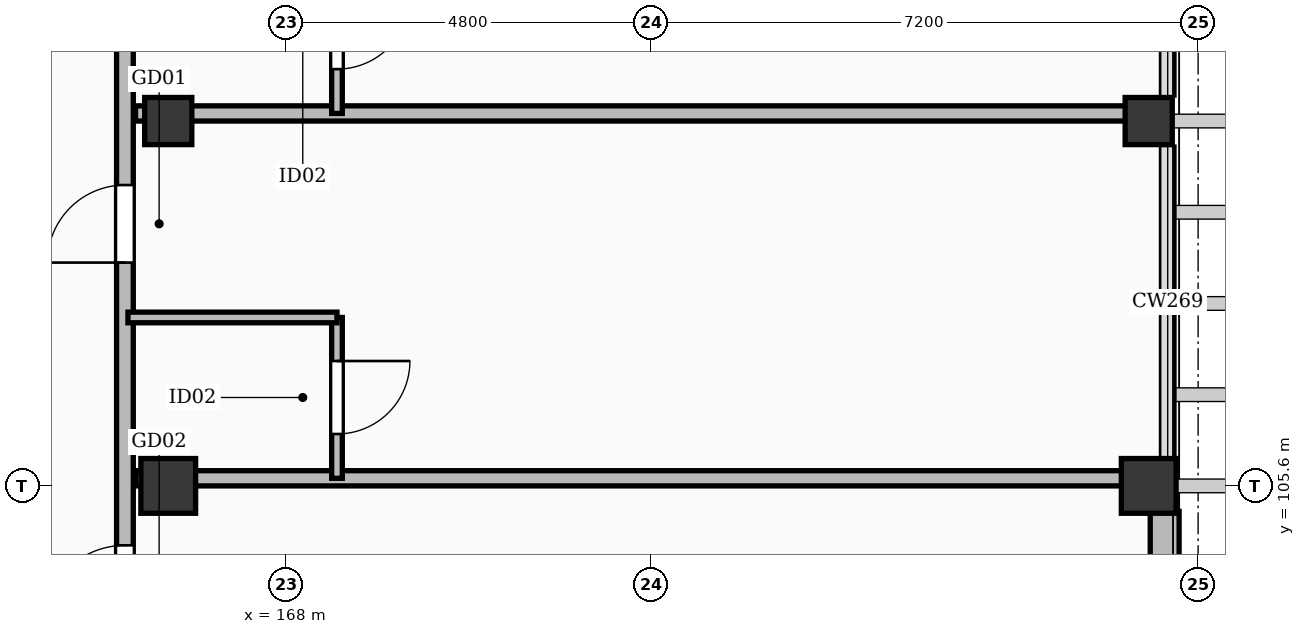
"""IFC4 building model, lengths in metres.
Left out: names, types, materials, properties, quantities, classifications, styles, units other than length and angle.
Written with IfcOpenShell. Run it as: python <this file> out.ifc"""

import sys

from ifc_helpers import new_model, si_unit, direction, frame, frame_2d, origin, origin_2d, place, context, subcontext, project, spatial, rectangle, extrude, element, fill, save


model = new_model("IFC4")
c1 = context("Model", 3, precision=1e-05, world=origin(), true_north=direction((0.0, 1.0)))
c2 = subcontext(c1, "Body", "Model", "MODEL_VIEW")
j1 = project(units=[si_unit("LENGTHUNIT", "METRE"), si_unit("PLANEANGLEUNIT", "RADIAN")], contexts=[c1])
p1 = place(None, origin())
s1 = spatial("IfcSite", under=j1, at=p1, CompositionType="ELEMENT")
p2 = place(p1, origin())
s2 = spatial("IfcBuilding", under=s1, at=p2, CompositionType="ELEMENT")
p3 = place(p2, frame((0.0, 0.0, 31.8)))
s3 = spatial("IfcBuildingStorey", under=s2, at=p3, CompositionType="ELEMENT", Elevation=31.8)
for number, where, z_axis, x_axis in (
    (1, (166.45, 105.6, 0.0), (0.0, 0.0, 1.0), (1.0, 0.0, 0.0)),
    (2, (179.35, 105.6, 0.0), (0.0, 0.0, 1.0), (1.0, 0.0, 0.0)),
):
    element("IfcColumn", number, at=place(p3, frame(where, z_axis=z_axis, x_axis=x_axis)), inside=s3, PredefinedType="COLUMN", context=c2, shape_type="SweptSolid", body=[
        extrude(rectangle(XDim=0.72, YDim=0.72, at=origin_2d()), origin(), (0.0, 0.0, 1.0), 3.6),
    ])
for number, where, z_axis, x_axis in (
    (3, (166.45, 110.4, 0.0), (0.0, 0.0, 1.0), (1.0, 0.0, 0.0)),
    (4, (179.35, 110.4, 0.0), (0.0, 0.0, 1.0), (1.0, 0.0, 0.0)),
):
    element("IfcColumn", number, at=place(p3, frame(where, z_axis=z_axis, x_axis=x_axis)), inside=s3, PredefinedType="COLUMN", context=c2, shape_type="SweptSolid", body=[
        extrude(rectangle(XDim=0.62, YDim=0.62, at=origin_2d()), origin(), (0.0, 0.0, 1.0), 3.6),
    ])
p4 = place(p3, frame((179.56, 105.265, 0.0), z_axis=(0.0, 0.0, 1.0), x_axis=(0.0, -1.0, 0.0)))
e5 = element("IfcWall", 5, at=p4, inside=s3, PredefinedType="SOLIDWALL", context=c2, shape_type="SweptSolid", body=[
    extrude(rectangle(XDim=4.18, YDim=0.38, at=frame_2d((2.09, 0.0))), origin(), (0.0, 0.0, 1.0), 2.602),
])
p5 = place(p4, frame((1.34, 0.0, 0.55)))
e6 = element("IfcOpeningElement", 6, at=p5, cuts=e5, PredefinedType="OPENING", context=c2, shape_type="SweptSolid", body=[
    extrude(rectangle(XDim=1.5, YDim=1.74, at=frame_2d((0.75, 0.87))), frame((0.0, 0.202, 0.0), z_axis=(0.0, -1.0, 0.0), x_axis=(1.0, 0.0, 0.0)), (0.0, 0.0, 1.0), 0.404),
])
p6 = place(p3, frame((165.88, 48.35, 0.0), z_axis=(0.0, 0.0, 1.0), x_axis=(0.0, 1.0, 0.0)))
e7 = element("IfcWall", 7, at=p6, inside=s3, PredefinedType="PARTITIONING", context=c2, shape_type="SweptSolid", body=[
    extrude(rectangle(XDim=77.3, YDim=0.22, at=frame_2d((38.65, 0.0))), origin(), (0.0, 0.0, 1.0), 2.602),
])
p7 = place(p6, frame((5.15, 0.0, 0.0)))
e8 = element("IfcOpeningElement", 8, at=p7, cuts=e7, PredefinedType="OPENING", context=c2, shape_type="SweptSolid", body=[
    extrude(rectangle(XDim=1.14, YDim=2.26, at=frame_2d((0.57, 1.13))), frame((0.0, 0.122, 0.0), z_axis=(0.0, -1.0, 0.0), x_axis=(1.0, 0.0, 0.0)), (0.0, 0.0, 1.0), 0.244),
])
p8 = place(p6, frame((12.188, 0.0, 0.0)))
e9 = element("IfcOpeningElement", 9, at=p8, cuts=e7, PredefinedType="OPENING", context=c2, shape_type="SweptSolid", body=[
    extrude(rectangle(XDim=1.12, YDim=2.15, at=frame_2d((0.56, 1.075))), frame((0.0, 0.122, 0.0), z_axis=(0.0, -1.0, 0.0), x_axis=(1.0, 0.0, 0.0)), (0.0, 0.0, 1.0), 0.244),
])
p9 = place(p6, frame((16.988, 0.0, 0.0)))
e10 = element("IfcOpeningElement", 10, at=p9, cuts=e7, PredefinedType="OPENING", context=c2, shape_type="SweptSolid", body=[
    extrude(rectangle(XDim=1.28, YDim=2.16, at=frame_2d((0.64, 1.08))), frame((0.0, 0.122, 0.0), z_axis=(0.0, -1.0, 0.0), x_axis=(1.0, 0.0, 0.0)), (0.0, 0.0, 1.0), 0.244),
])
p10 = place(p6, frame((21.788, 0.0, 0.0)))
e11 = element("IfcOpeningElement", 11, at=p10, cuts=e7, PredefinedType="OPENING", context=c2, shape_type="SweptSolid", body=[
    extrude(rectangle(XDim=1.05, YDim=2.18, at=frame_2d((0.525, 1.09))), frame((0.0, 0.122, 0.0), z_axis=(0.0, -1.0, 0.0), x_axis=(1.0, 0.0, 0.0)), (0.0, 0.0, 1.0), 0.244),
])
p11 = place(p6, frame((26.588, 0.0, 0.0)))
e12 = element("IfcOpeningElement", 12, at=p11, cuts=e7, PredefinedType="OPENING", context=c2, shape_type="SweptSolid", body=[
    extrude(rectangle(XDim=1.08, YDim=2.25, at=frame_2d((0.54, 1.125))), frame((0.0, 0.122, 0.0), z_axis=(0.0, -1.0, 0.0), x_axis=(1.0, 0.0, 0.0)), (0.0, 0.0, 1.0), 0.244),
])
p12 = place(p6, frame((31.388, 0.0, 0.0)))
e13 = element("IfcOpeningElement", 13, at=p12, cuts=e7, PredefinedType="OPENING", context=c2, shape_type="SweptSolid", body=[
    extrude(rectangle(XDim=1.02, YDim=2.2, at=frame_2d((0.51, 1.1))), frame((0.0, 0.122, 0.0), z_axis=(0.0, -1.0, 0.0), x_axis=(1.0, 0.0, 0.0)), (0.0, 0.0, 1.0), 0.244),
])
p13 = place(p6, frame((35.838, 0.0, 0.0)))
e14 = element("IfcOpeningElement", 14, at=p13, cuts=e7, PredefinedType="OPENING", context=c2, shape_type="SweptSolid", body=[
    extrude(rectangle(XDim=1.5, YDim=2.3, at=frame_2d((0.75, 1.15))), frame((0.0, 0.122, 0.0), z_axis=(0.0, -1.0, 0.0), x_axis=(1.0, 0.0, 0.0)), (0.0, 0.0, 1.0), 0.244),
])
p14 = place(p6, frame((40.988, 0.0, 0.0)))
e15 = element("IfcOpeningElement", 15, at=p14, cuts=e7, PredefinedType="OPENING", context=c2, shape_type="SweptSolid", body=[
    extrude(rectangle(XDim=1.12, YDim=2.15, at=frame_2d((0.56, 1.075))), frame((0.0, 0.122, 0.0), z_axis=(0.0, -1.0, 0.0), x_axis=(1.0, 0.0, 0.0)), (0.0, 0.0, 1.0), 0.244),
])
p15 = place(p6, frame((45.788, 0.0, 0.0)))
e16 = element("IfcOpeningElement", 16, at=p15, cuts=e7, PredefinedType="OPENING", context=c2, shape_type="SweptSolid", body=[
    extrude(rectangle(XDim=1.28, YDim=2.16, at=frame_2d((0.64, 1.08))), frame((0.0, 0.122, 0.0), z_axis=(0.0, -1.0, 0.0), x_axis=(1.0, 0.0, 0.0)), (0.0, 0.0, 1.0), 0.244),
])
p16 = place(p6, frame((50.588, 0.0, 0.0)))
e17 = element("IfcOpeningElement", 17, at=p16, cuts=e7, PredefinedType="OPENING", context=c2, shape_type="SweptSolid", body=[
    extrude(rectangle(XDim=1.05, YDim=2.18, at=frame_2d((0.525, 1.09))), frame((0.0, 0.122, 0.0), z_axis=(0.0, -1.0, 0.0), x_axis=(1.0, 0.0, 0.0)), (0.0, 0.0, 1.0), 0.244),
])
p17 = place(p6, frame((55.388, 0.0, 0.0)))
e18 = element("IfcOpeningElement", 18, at=p17, cuts=e7, PredefinedType="OPENING", context=c2, shape_type="SweptSolid", body=[
    extrude(rectangle(XDim=1.08, YDim=2.25, at=frame_2d((0.54, 1.125))), frame((0.0, 0.122, 0.0), z_axis=(0.0, -1.0, 0.0), x_axis=(1.0, 0.0, 0.0)), (0.0, 0.0, 1.0), 0.244),
])
p18 = place(p6, frame((60.188, 0.0, 0.0)))
e19 = element("IfcOpeningElement", 19, at=p18, cuts=e7, PredefinedType="OPENING", context=c2, shape_type="SweptSolid", body=[
    extrude(rectangle(XDim=1.02, YDim=2.2, at=frame_2d((0.51, 1.1))), frame((0.0, 0.122, 0.0), z_axis=(0.0, -1.0, 0.0), x_axis=(1.0, 0.0, 0.0)), (0.0, 0.0, 1.0), 0.244),
])
p19 = place(p6, frame((64.638, 0.0, 0.0)))
e20 = element("IfcOpeningElement", 20, at=p19, cuts=e7, PredefinedType="OPENING", context=c2, shape_type="SweptSolid", body=[
    extrude(rectangle(XDim=1.5, YDim=2.3, at=frame_2d((0.75, 1.15))), frame((0.0, 0.122, 0.0), z_axis=(0.0, -1.0, 0.0), x_axis=(1.0, 0.0, 0.0)), (0.0, 0.0, 1.0), 0.244),
])
p20 = place(p6, frame((69.788, 0.0, 0.0)))
e21 = element("IfcOpeningElement", 21, at=p20, cuts=e7, PredefinedType="OPENING", context=c2, shape_type="SweptSolid", body=[
    extrude(rectangle(XDim=1.12, YDim=2.15, at=frame_2d((0.56, 1.075))), frame((0.0, 0.122, 0.0), z_axis=(0.0, -1.0, 0.0), x_axis=(1.0, 0.0, 0.0)), (0.0, 0.0, 1.0), 0.244),
])
p21 = place(p6, frame((74.588, 0.0, 0.0)))
e22 = element("IfcOpeningElement", 22, at=p21, cuts=e7, PredefinedType="OPENING", context=c2, shape_type="SweptSolid", body=[
    extrude(rectangle(XDim=1.28, YDim=2.16, at=frame_2d((0.64, 1.08))), frame((0.0, 0.122, 0.0), z_axis=(0.0, -1.0, 0.0), x_axis=(1.0, 0.0, 0.0)), (0.0, 0.0, 1.0), 0.244),
])
p22 = place(p3, frame((166.02, 105.7, 0.0), z_axis=(0.0, 0.0, 1.0), x_axis=(1.0, 0.0, 0.0)))
e23 = element("IfcWall", 23, at=p22, inside=s3, PredefinedType="PARTITIONING", context=c2, shape_type="SweptSolid", body=[
    extrude(rectangle(XDim=13.23, YDim=0.2, at=frame_2d((6.615, 0.0))), origin(), (0.0, 0.0, 1.0), 2.602),
])
p23 = place(p3, frame((168.67, 105.7, 0.0), z_axis=(0.0, 0.0, 1.0), x_axis=(0.0, 1.0, 0.0)))
e24 = element("IfcWall", 24, at=p23, inside=s3, PredefinedType="PARTITIONING", context=c2, shape_type="SweptSolid", body=[
    extrude(rectangle(XDim=2.116, YDim=0.14, at=frame_2d((1.058, 0.0))), origin(), (0.0, 0.0, 1.0), 2.732),
])
p24 = place(p23, frame((0.583, 0.0, 0.0)))
e25 = element("IfcOpeningElement", 25, at=p24, cuts=e24, PredefinedType="OPENING", context=c2, shape_type="SweptSolid", body=[
    extrude(rectangle(XDim=0.96, YDim=2.12, at=frame_2d((0.48, 1.06))), frame((0.0, 0.082, 0.0), z_axis=(0.0, -1.0, 0.0), x_axis=(1.0, 0.0, 0.0)), (0.0, 0.0, 1.0), 0.164),
])
p25 = place(p3, frame((165.92, 107.816, 0.0), z_axis=(0.0, 0.0, 1.0), x_axis=(1.0, 0.0, 0.0)))
e26 = element("IfcWall", 26, at=p25, inside=s3, PredefinedType="PARTITIONING", context=c2, shape_type="SweptSolid", body=[
    extrude(rectangle(XDim=2.75, YDim=0.14, at=frame_2d((1.375, 0.0))), origin(), (0.0, 0.0, 1.0), 2.732),
])
p26 = place(p3, frame((166.02, 110.5, 0.0), z_axis=(0.0, 0.0, 1.0), x_axis=(1.0, 0.0, 0.0)))
e27 = element("IfcWall", 27, at=p26, inside=s3, PredefinedType="PARTITIONING", context=c2, shape_type="SweptSolid", body=[
    extrude(rectangle(XDim=13.23, YDim=0.2, at=frame_2d((6.615, 0.0))), origin(), (0.0, 0.0, 1.0), 2.602),
])
p27 = place(p3, frame((168.67, 110.5, 0.0), z_axis=(0.0, 0.0, 1.0), x_axis=(0.0, 1.0, 0.0)))
e28 = element("IfcWall", 28, at=p27, inside=s3, PredefinedType="PARTITIONING", context=c2, shape_type="SweptSolid", body=[
    extrude(rectangle(XDim=2.116, YDim=0.14, at=frame_2d((1.058, 0.0))), origin(), (0.0, 0.0, 1.0), 2.732),
])
p28 = place(p27, frame((0.583, 0.0, 0.0)))
e29 = element("IfcOpeningElement", 29, at=p28, cuts=e28, PredefinedType="OPENING", context=c2, shape_type="SweptSolid", body=[
    extrude(rectangle(XDim=0.96, YDim=2.12, at=frame_2d((0.48, 1.06))), frame((0.0, 0.082, 0.0), z_axis=(0.0, -1.0, 0.0), x_axis=(1.0, 0.0, 0.0)), (0.0, 0.0, 1.0), 0.164),
])
p29 = place(p17, origin())
e30 = element("IfcDoor", 30, at=p29, inside=s3, OperationType="SINGLE_SWING_LEFT", PredefinedType="DOOR", context=c2, shape_type="SweptSolid", body=[
    extrude(rectangle(XDim=1.08, YDim=2.25, at=frame_2d((0.54, 1.125))), frame((0.0, 0.025, 0.0), z_axis=(0.0, -1.0, 0.0), x_axis=(1.0, 0.0, 0.0)), (0.0, 0.0, 1.0), 0.05),
])
fill(e18, e30)
p30 = place(p18, origin())
e31 = element("IfcDoor", 31, at=p30, inside=s3, OperationType="SINGLE_SWING_LEFT", PredefinedType="DOOR", context=c2, shape_type="SweptSolid", body=[
    extrude(rectangle(XDim=1.02, YDim=2.2, at=frame_2d((0.51, 1.1))), frame((0.0, 0.025, 0.0), z_axis=(0.0, -1.0, 0.0), x_axis=(1.0, 0.0, 0.0)), (0.0, 0.0, 1.0), 0.05),
])
fill(e19, e31)
p31 = place(p24, frame((0.96, 0.0, 0.0), z_axis=(0.0, 0.0, 1.0), x_axis=(-1.0, 0.0, 0.0)))
e32 = element("IfcDoor", 32, at=p31, inside=s3, OperationType="SINGLE_SWING_RIGHT", PredefinedType="DOOR", context=c2, shape_type="SweptSolid", body=[
    extrude(rectangle(XDim=0.96, YDim=2.12, at=frame_2d((0.48, 1.06))), frame((0.0, 0.025, 0.0), z_axis=(0.0, -1.0, 0.0), x_axis=(1.0, 0.0, 0.0)), (0.0, 0.0, 1.0), 0.05),
])
fill(e25, e32)
p32 = place(p28, frame((0.96, 0.0, 0.0), z_axis=(0.0, 0.0, 1.0), x_axis=(-1.0, 0.0, 0.0)))
e33 = element("IfcDoor", 33, at=p32, inside=s3, OperationType="SINGLE_SWING_RIGHT", PredefinedType="DOOR", context=c2, shape_type="SweptSolid", body=[
    extrude(rectangle(XDim=0.96, YDim=2.12, at=frame_2d((0.48, 1.06))), frame((0.0, 0.025, 0.0), z_axis=(0.0, -1.0, 0.0), x_axis=(1.0, 0.0, 0.0)), (0.0, 0.0, 1.0), 0.05),
])
fill(e29, e33)
save(model, sys.argv[1])
